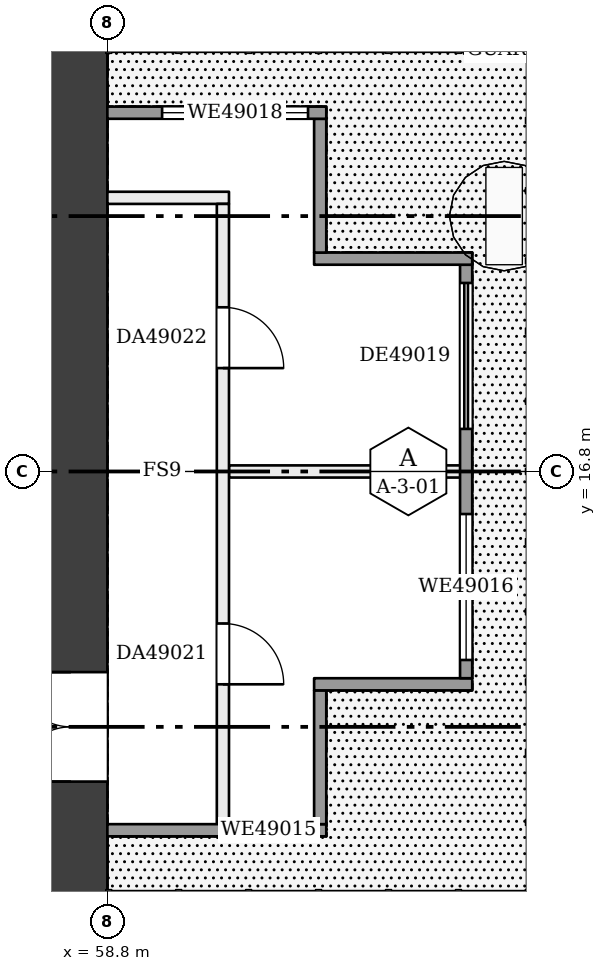
"""IFC4 building model, lengths in metres.
Left out: names, types, materials, properties, quantities, classifications, styles, units other than length and angle.
Written with IfcOpenShell. Run it as: python <this file> out.ifc"""

import sys

from ifc_helpers import new_model, si_unit, direction, frame, frame_2d, origin, place, context, subcontext, project, spatial, rectangle, extrude, element, fill, save


model = new_model("IFC4")
c1 = context("Model", 3, precision=1e-05, world=origin(), true_north=direction((0.0, 1.0)))
c2 = subcontext(c1, "Body", "Model", "MODEL_VIEW")
j1 = project(units=[si_unit("LENGTHUNIT", "METRE"), si_unit("PLANEANGLEUNIT", "RADIAN")], contexts=[c1])
p1 = place(None, origin())
s1 = spatial("IfcSite", under=j1, at=p1, CompositionType="ELEMENT")
p2 = place(p1, origin())
s2 = spatial("IfcBuilding", under=s1, at=p2, CompositionType="ELEMENT")
p3 = place(p2, frame((0.0, 0.0, 189.7)))
s3 = spatial("IfcBuildingStorey", under=s2, at=p3, CompositionType="ELEMENT", Elevation=189.7)
p4 = place(p3, frame((58.2, 9.6, 0.0), z_axis=(0.0, 0.0, 1.0), x_axis=(0.0, 1.0, 0.0)))
e1 = element("IfcWall", 1, at=p4, inside=s3, PredefinedType="SHEAR", context=c2, shape_type="SweptSolid", body=[
    extrude(rectangle(XDim=14.4, YDim=1.2, at=frame_2d((7.2, 0.0))), origin(), (0.0, 0.0, 1.0), 3.22),
])
p5 = place(p4, frame((2.1, 0.0, 0.0)))
e2 = element("IfcOpeningElement", 2, at=p5, cuts=e1, PredefinedType="OPENING", context=c2, shape_type="SweptSolid", body=[
    extrude(rectangle(XDim=1.8, YDim=2.1, at=frame_2d((0.9, 1.05))), frame((0.0, 0.61, 0.0), z_axis=(0.0, -1.0, 0.0), x_axis=(1.0, 0.0, 0.0)), (0.0, 0.0, 1.0), 1.22),
])
p6 = place(p3, frame((60.8, 16.8, 0.0), z_axis=(0.0, 0.0, 1.0), x_axis=(1.0, 0.0, 0.0)))
e3 = element("IfcWall", 3, at=p6, inside=s3, PredefinedType="PARTITIONING", context=c2, shape_type="SweptSolid", body=[
    extrude(rectangle(XDim=3.9, YDim=0.2, at=frame_2d((1.95, 0.0))), origin(), (0.0, 0.0, 1.0), 3.22),
])
p7 = place(p3, frame((58.8, 21.3, 0.0), z_axis=(0.0, 0.0, 1.0), x_axis=(1.0, 0.0, 0.0)))
e4 = element("IfcWall", 4, at=p7, inside=s3, PredefinedType="PARTITIONING", context=c2, shape_type="SweptSolid", body=[
    extrude(rectangle(XDim=2.0, YDim=0.2, at=frame_2d((1.0, 0.0))), origin(), (0.0, 0.0, 1.0), 3.22),
])
p8 = place(p3, frame((60.7, 10.9, 0.0), z_axis=(0.0, 0.0, 1.0), x_axis=(0.0, 1.0, 0.0)))
e5 = element("IfcWall", 5, at=p8, inside=s3, PredefinedType="PARTITIONING", context=c2, shape_type="SweptSolid", body=[
    extrude(rectangle(XDim=10.3, YDim=0.2, at=frame_2d((5.15, 0.0))), origin(), (0.0, 0.0, 1.0), 3.22),
])
p9 = place(p8, frame((2.4, 0.0, 0.0)))
e6 = element("IfcOpeningElement", 6, at=p9, cuts=e5, PredefinedType="OPENING", context=c2, shape_type="SweptSolid", body=[
    extrude(rectangle(XDim=1.0, YDim=2.1, at=frame_2d((0.5, 1.05))), frame((0.0, 0.11, 0.0), z_axis=(0.0, -1.0, 0.0), x_axis=(1.0, 0.0, 0.0)), (0.0, 0.0, 1.0), 0.22),
])
p10 = place(p8, frame((7.6, 0.0, 0.0)))
e7 = element("IfcOpeningElement", 7, at=p10, cuts=e5, PredefinedType="OPENING", context=c2, shape_type="SweptSolid", body=[
    extrude(rectangle(XDim=1.0, YDim=2.1, at=frame_2d((0.5, 1.05))), frame((0.0, 0.11, 0.0), z_axis=(0.0, -1.0, 0.0), x_axis=(1.0, 0.0, 0.0)), (0.0, 0.0, 1.0), 0.22),
])
p11 = place(p3, frame((58.8, 10.9, 0.0), z_axis=(0.0, 0.0, 1.0), x_axis=(1.0, 0.0, 0.0)))
e8 = element("IfcWall", 8, at=p11, inside=s3, PredefinedType="SOLIDWALL", context=c2, shape_type="SweptSolid", body=[
    extrude(rectangle(XDim=3.6, YDim=0.2, at=frame_2d((1.8, 0.0))), origin(), (0.0, 0.0, 1.0), 3.22),
])
p12 = place(p11, frame((2.0, 0.0, 0.9)))
e9 = element("IfcOpeningElement", 9, at=p12, cuts=e8, PredefinedType="OPENING", context=c2, shape_type="SweptSolid", body=[
    extrude(rectangle(XDim=1.3, YDim=1.5, at=frame_2d((0.65, 0.75))), frame((0.0, 0.11, 0.0), z_axis=(0.0, -1.0, 0.0), x_axis=(1.0, 0.0, 0.0)), (0.0, 0.0, 1.0), 0.22),
])
p13 = place(p3, frame((62.3, 11.0, 0.0), z_axis=(0.0, 0.0, 1.0), x_axis=(0.0, 1.0, 0.0)))
e10 = element("IfcWall", 10, at=p13, inside=s3, PredefinedType="SOLIDWALL", context=c2, shape_type="SweptSolid", body=[
    extrude(rectangle(XDim=2.2, YDim=0.2, at=frame_2d((1.1, 0.0))), origin(), (0.0, 0.0, 1.0), 3.22),
])
p14 = place(p3, frame((62.2, 13.3, 0.0), z_axis=(0.0, 0.0, 1.0), x_axis=(1.0, 0.0, 0.0)))
e11 = element("IfcWall", 11, at=p14, inside=s3, PredefinedType="SOLIDWALL", context=c2, shape_type="SweptSolid", body=[
    extrude(rectangle(XDim=2.6, YDim=0.2, at=frame_2d((1.3, 0.0))), origin(), (0.0, 0.0, 1.0), 3.22),
])
p15 = place(p3, frame((64.7, 13.4, 0.0), z_axis=(0.0, 0.0, 1.0), x_axis=(0.0, 1.0, 0.0)))
e12 = element("IfcWall", 12, at=p15, inside=s3, PredefinedType="SOLIDWALL", context=c2, shape_type="SweptSolid", body=[
    extrude(rectangle(XDim=6.8, YDim=0.2, at=frame_2d((3.4, 0.0))), origin(), (0.0, 0.0, 1.0), 3.22),
])
p16 = place(p15, frame((0.3, 0.0, 0.9)))
e13 = element("IfcOpeningElement", 13, at=p16, cuts=e12, PredefinedType="OPENING", context=c2, shape_type="SweptSolid", body=[
    extrude(rectangle(XDim=2.4, YDim=1.5, at=frame_2d((1.2, 0.75))), frame((0.0, 0.11, 0.0), z_axis=(0.0, -1.0, 0.0), x_axis=(1.0, 0.0, 0.0)), (0.0, 0.0, 1.0), 0.22),
])
p17 = place(p15, frame((4.1, 0.0, 0.0)))
e14 = element("IfcOpeningElement", 14, at=p17, cuts=e12, PredefinedType="OPENING", context=c2, shape_type="SweptSolid", body=[
    extrude(rectangle(XDim=2.4, YDim=2.2, at=frame_2d((1.2, 1.1))), frame((0.0, 0.11, 0.0), z_axis=(0.0, -1.0, 0.0), x_axis=(1.0, 0.0, 0.0)), (0.0, 0.0, 1.0), 0.22),
])
p18 = place(p3, frame((64.8, 20.3, 0.0), z_axis=(0.0, 0.0, 1.0), x_axis=(-1.0, 0.0, 0.0)))
e15 = element("IfcWall", 15, at=p18, inside=s3, PredefinedType="SOLIDWALL", context=c2, shape_type="SweptSolid", body=[
    extrude(rectangle(XDim=2.6, YDim=0.2, at=frame_2d((1.3, 0.0))), origin(), (0.0, 0.0, 1.0), 3.22),
])
p19 = place(p3, frame((62.3, 20.4, 0.0), z_axis=(0.0, 0.0, 1.0), x_axis=(0.0, 1.0, 0.0)))
e16 = element("IfcWall", 16, at=p19, inside=s3, PredefinedType="SOLIDWALL", context=c2, shape_type="SweptSolid", body=[
    extrude(rectangle(XDim=2.2, YDim=0.2, at=frame_2d((1.1, 0.0))), origin(), (0.0, 0.0, 1.0), 3.22),
])
p20 = place(p3, frame((62.4, 22.7, 0.0), z_axis=(0.0, 0.0, 1.0), x_axis=(-1.0, 0.0, 0.0)))
e17 = element("IfcWall", 17, at=p20, inside=s3, PredefinedType="SOLIDWALL", context=c2, shape_type="SweptSolid", body=[
    extrude(rectangle(XDim=3.6, YDim=0.2, at=frame_2d((1.8, 0.0))), origin(), (0.0, 0.0, 1.0), 3.22),
])
p21 = place(p20, frame((0.3, 0.0, 0.9)))
e18 = element("IfcOpeningElement", 18, at=p21, cuts=e17, PredefinedType="OPENING", context=c2, shape_type="SweptSolid", body=[
    extrude(rectangle(XDim=2.4, YDim=1.5, at=frame_2d((1.2, 0.75))), frame((0.0, 0.11, 0.0), z_axis=(0.0, -1.0, 0.0), x_axis=(1.0, 0.0, 0.0)), (0.0, 0.0, 1.0), 0.22),
])
p22 = place(p5, origin())
e19 = element("IfcDoor", 19, at=p22, inside=s3, OperationType="DOUBLE_DOOR_SINGLE_SWING", PredefinedType="DOOR", context=c2, shape_type="SweptSolid", body=[
    extrude(rectangle(XDim=1.8, YDim=2.1, at=frame_2d((0.9, 1.05))), frame((0.0, 0.025, 0.0), z_axis=(0.0, -1.0, 0.0), x_axis=(1.0, 0.0, 0.0)), (0.0, 0.0, 1.0), 0.05),
])
fill(e2, e19)
p23 = place(p9, frame((1.0, 0.0, 0.0), z_axis=(0.0, 0.0, 1.0), x_axis=(-1.0, 0.0, 0.0)))
e20 = element("IfcDoor", 20, at=p23, inside=s3, OperationType="SINGLE_SWING_RIGHT", PredefinedType="DOOR", context=c2, shape_type="SweptSolid", body=[
    extrude(rectangle(XDim=1.0, YDim=2.1, at=frame_2d((0.5, 1.05))), frame((0.0, 0.025, 0.0), z_axis=(0.0, -1.0, 0.0), x_axis=(1.0, 0.0, 0.0)), (0.0, 0.0, 1.0), 0.05),
])
fill(e6, e20)
p24 = place(p10, frame((1.0, 0.0, 0.0), z_axis=(0.0, 0.0, 1.0), x_axis=(-1.0, 0.0, 0.0)))
e21 = element("IfcDoor", 21, at=p24, inside=s3, OperationType="SINGLE_SWING_RIGHT", PredefinedType="DOOR", context=c2, shape_type="SweptSolid", body=[
    extrude(rectangle(XDim=1.0, YDim=2.1, at=frame_2d((0.5, 1.05))), frame((0.0, 0.025, 0.0), z_axis=(0.0, -1.0, 0.0), x_axis=(1.0, 0.0, 0.0)), (0.0, 0.0, 1.0), 0.05),
])
fill(e7, e21)
p25 = place(p12, origin())
e22 = element("IfcWindow", 22, at=p25, inside=s3, PartitioningType="SINGLE_PANEL", PredefinedType="WINDOW", context=c2, shape_type="SweptSolid", body=[
    extrude(rectangle(XDim=1.3, YDim=1.5, at=frame_2d((0.65, 0.75))), frame((0.0, 0.03, 0.0), z_axis=(0.0, -1.0, 0.0), x_axis=(1.0, 0.0, 0.0)), (0.0, 0.0, 1.0), 0.06),
])
fill(e9, e22)
p26 = place(p16, origin())
e23 = element("IfcWindow", 23, at=p26, inside=s3, PartitioningType="SINGLE_PANEL", PredefinedType="WINDOW", context=c2, shape_type="SweptSolid", body=[
    extrude(rectangle(XDim=2.4, YDim=1.5, at=frame_2d((1.2, 0.75))), frame((0.0, 0.03, 0.0), z_axis=(0.0, -1.0, 0.0), x_axis=(1.0, 0.0, 0.0)), (0.0, 0.0, 1.0), 0.06),
])
fill(e13, e23)
p27 = place(p21, origin())
e24 = element("IfcWindow", 24, at=p27, inside=s3, PartitioningType="SINGLE_PANEL", PredefinedType="WINDOW", context=c2, shape_type="SweptSolid", body=[
    extrude(rectangle(XDim=2.4, YDim=1.5, at=frame_2d((1.2, 0.75))), frame((0.0, 0.03, 0.0), z_axis=(0.0, -1.0, 0.0), x_axis=(1.0, 0.0, 0.0)), (0.0, 0.0, 1.0), 0.06),
])
fill(e18, e24)
p28 = place(p17, origin())
e25 = element("IfcDoor", 25, at=p28, inside=s3, OperationType="DOUBLE_DOOR_SLIDING", PredefinedType="DOOR", context=c2, shape_type="SweptSolid", body=[
    extrude(rectangle(XDim=2.4, YDim=2.2, at=frame_2d((1.2, 1.1))), frame((0.0, 0.025, 0.0), z_axis=(0.0, -1.0, 0.0), x_axis=(1.0, 0.0, 0.0)), (0.0, 0.0, 1.0), 0.05),
])
fill(e14, e25)
save(model, sys.argv[1])
